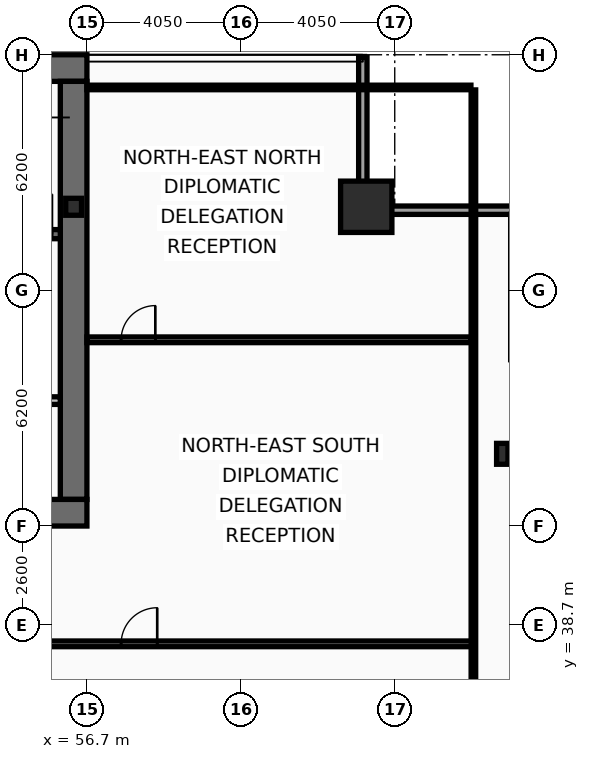
"""IFC4 building model, lengths in metres.
Left out: names, types, materials, properties, quantities, classifications, styles, units other than length and angle.
Written with IfcOpenShell. Run it as: python <this file> out.ifc"""

import sys

from ifc_helpers import new_model, si_unit, direction, frame, frame_2d, origin, origin_2d, place, context, subcontext, project, spatial, rectangle, hollow_rectangle, i_section, extrude, element, fill, save


model = new_model("IFC4")
c1 = context("Model", 3, precision=1e-05, world=origin(), true_north=direction((0.0, 1.0)))
c2 = subcontext(c1, "Body", "Model", "MODEL_VIEW")
j1 = project(units=[si_unit("LENGTHUNIT", "METRE"), si_unit("PLANEANGLEUNIT", "RADIAN")], contexts=[c1])
p1 = place(None, origin())
s1 = spatial("IfcSite", under=j1, at=p1, CompositionType="ELEMENT")
p2 = place(p1, origin())
s2 = spatial("IfcBuilding", under=s1, at=p2, CompositionType="ELEMENT")
p3 = place(p2, frame((0.0, 0.0, 139.8)))
s3 = spatial("IfcBuildingStorey", under=s2, at=p3, CompositionType="ELEMENT", Elevation=139.8)
p4 = place(p3, frame((16.2, 53.35, 0.0), z_axis=(0.0, 0.0, 1.0), x_axis=(1.0, 0.0, 0.0)))
e1 = element("IfcWall", 1, at=p4, inside=s3, PredefinedType="SHEAR", context=c2, shape_type="SweptSolid", body=[
    extrude(rectangle(XDim=40.5, YDim=0.7, at=frame_2d((20.25, 0.0))), origin(), (0.0, 0.0, 1.0), 3.44),
])
p5 = place(p3, frame((56.35, 53.0, 0.0), z_axis=(0.0, 0.0, 1.0), x_axis=(0.0, -1.0, 0.0)))
e2 = element("IfcWall", 2, at=p5, inside=s3, PredefinedType="SHEAR", context=c2, shape_type="SweptSolid", body=[
    extrude(rectangle(XDim=11.0, YDim=0.7, at=frame_2d((5.5, 0.0))), origin(), (0.0, 0.0, 1.0), 3.44),
])
p6 = place(p3, frame((56.7, 41.65, 0.0), z_axis=(0.0, 0.0, 1.0), x_axis=(-1.0, 0.0, 0.0)))
e3 = element("IfcWall", 3, at=p6, inside=s3, PredefinedType="SHEAR", context=c2, shape_type="SweptSolid", body=[
    extrude(rectangle(XDim=2.45, YDim=0.7, at=frame_2d((1.225, 0.0))), origin(), (0.0, 0.0, 1.0), 3.44),
])
p7 = place(p3, frame((48.63, 48.98, 0.0), z_axis=(0.0, 0.0, 1.0), x_axis=(1.0, 0.0, 0.0)))
e4 = element("IfcWall", 4, at=p7, inside=s3, PredefinedType="SHEAR", context=c2, shape_type="SweptSolid", body=[
    extrude(rectangle(XDim=7.37, YDim=0.24, at=frame_2d((3.685, 0.0))), origin(), (0.0, 0.0, 1.0), 3.44),
])
p8 = place(p7, frame((6.1, 0.0, 0.0)))
e5 = element("IfcOpeningElement", 5, at=p8, cuts=e4, PredefinedType="OPENING", context=c2, shape_type="SweptSolid", body=[
    extrude(rectangle(XDim=1.05, YDim=2.15, at=frame_2d((0.525, 1.075))), frame((0.0, 0.13, 0.0), z_axis=(0.0, -1.0, 0.0), x_axis=(1.0, 0.0, 0.0)), (0.0, 0.0, 1.0), 0.26),
])
p9 = place(p3, frame((64.05, 49.7, 0.0), z_axis=(0.0, 0.0, 1.0), x_axis=(1.0, 0.0, 0.0)))
e6 = element("IfcColumn", 6, at=p9, inside=s3, PredefinedType="COLUMN", context=c2, shape_type="SweptSolid", body=[
    extrude(hollow_rectangle(XDim=1.35, YDim=1.35, WallThickness=0.065, at=origin_2d()), origin(), (0.0, 0.0, 1.0), 3.6),
])
p10 = place(p3, frame((67.63, 43.2, 0.0), z_axis=(0.0, 0.0, 1.0), x_axis=(1.0, 0.0, 0.0)))
e7 = element("IfcColumn", 7, at=p10, inside=s3, PredefinedType="COLUMN", context=c2, shape_type="SweptSolid", body=[
    extrude(i_section(OverallWidth=0.3, OverallDepth=0.55, WebThickness=0.015, FlangeThickness=0.029, at=origin_2d()), origin(), (0.0, 0.0, 1.0), 3.6),
])
p11 = place(p3, frame((56.35, 49.7, 0.0), z_axis=(0.0, 0.0, 1.0), x_axis=(1.0, 0.0, 0.0)))
e8 = element("IfcColumn", 8, at=p11, inside=s3, PredefinedType="COLUMN", context=c2, shape_type="SweptSolid", body=[
    extrude(i_section(OverallWidth=0.416, OverallDepth=0.446, WebThickness=0.039, FlangeThickness=0.063, at=origin_2d()), origin(), (0.0, 0.0, 1.0), 3.6),
])
p12 = place(p3, frame((63.96, 53.63, 0.0), z_axis=(0.0, 0.0, 1.0), x_axis=(0.0, -1.0, 0.0)))
e9 = element("IfcWall", 9, at=p12, inside=s3, PredefinedType="SOLIDWALL", context=c2, shape_type="SweptSolid", body=[
    extrude(rectangle(XDim=3.91, YDim=0.22, at=frame_2d((1.955, 0.0))), origin(), (0.0, 0.0, 1.0), 2.83),
])
p13 = place(p3, frame((63.85, 49.61, 0.0), z_axis=(0.0, 0.0, 1.0), x_axis=(1.0, 0.0, 0.0)))
e10 = element("IfcWall", 10, at=p13, inside=s3, PredefinedType="SOLIDWALL", context=c2, shape_type="SweptSolid", body=[
    extrude(rectangle(XDim=4.22, YDim=0.22, at=frame_2d((2.11, 0.0))), origin(), (0.0, 0.0, 1.0), 2.83),
])
p14 = place(p3, frame((51.9, 44.6, 0.0), z_axis=(0.0, 0.0, 1.0), x_axis=(1.0, 0.0, 0.0)))
e11 = element("IfcWall", 11, at=p14, inside=s3, PredefinedType="PARTITIONING", context=c2, shape_type="SweptSolid", body=[
    extrude(rectangle(XDim=4.1, YDim=0.2, at=frame_2d((2.05, 0.0))), origin(), (0.0, 0.0, 1.0), 3.44),
])
p15 = place(p14, frame((1.15, 0.0, 0.0)))
e12 = element("IfcOpeningElement", 12, at=p15, cuts=e11, PredefinedType="OPENING", context=c2, shape_type="SweptSolid", body=[
    extrude(rectangle(XDim=1.05, YDim=2.15, at=frame_2d((0.525, 1.075))), frame((0.0, 0.11, 0.0), z_axis=(0.0, -1.0, 0.0), x_axis=(1.0, 0.0, 0.0)), (0.0, 0.0, 1.0), 0.22),
])
p16 = place(p3, frame((54.35, 38.2, 0.0), z_axis=(0.0, 0.0, 1.0), x_axis=(1.0, 0.0, 0.0)))
e13 = element("IfcWall", 13, at=p16, inside=s3, PredefinedType="PARTITIONING", context=c2, shape_type="SweptSolid", body=[
    extrude(rectangle(XDim=12.52, YDim=0.15, at=frame_2d((6.26, 0.0))), origin(), (0.0, 0.0, 1.0), 2.73),
])
p17 = place(p16, frame((3.25, 0.0, 0.0)))
e14 = element("IfcOpeningElement", 14, at=p17, cuts=e13, PredefinedType="OPENING", context=c2, shape_type="SweptSolid", body=[
    extrude(rectangle(XDim=0.95, YDim=2.05, at=frame_2d((0.475, 1.025))), frame((0.0, 0.085, 0.0), z_axis=(0.0, -1.0, 0.0), x_axis=(1.0, 0.0, 0.0)), (0.0, 0.0, 1.0), 0.17),
])
p18 = place(p3, frame((56.7, 46.2, 0.0), z_axis=(0.0, 0.0, 1.0), x_axis=(1.0, 0.0, 0.0)))
e15 = element("IfcWall", 15, at=p18, inside=s3, PredefinedType="PARTITIONING", context=c2, shape_type="SweptSolid", body=[
    extrude(rectangle(XDim=10.105, YDim=0.15, at=frame_2d((5.052, 0.0))), origin(), (0.0, 0.0, 1.0), 2.83),
])
p19 = place(p18, frame((0.9, 0.0, 0.0)))
e16 = element("IfcOpeningElement", 16, at=p19, cuts=e15, PredefinedType="OPENING", context=c2, shape_type="SweptSolid", body=[
    extrude(rectangle(XDim=0.9, YDim=2.05, at=frame_2d((0.45, 1.025))), frame((0.0, 0.085, 0.0), z_axis=(0.0, -1.0, 0.0), x_axis=(1.0, 0.0, 0.0)), (0.0, 0.0, 1.0), 0.17),
])
p20 = place(p3, frame((66.87, 10.665, 0.0), z_axis=(0.0, 0.0, 1.0), x_axis=(0.0, 1.0, 0.0)))
e17 = element("IfcWall", 17, at=p20, inside=s3, PredefinedType="PARTITIONING", context=c2, shape_type="SweptSolid", body=[
    extrude(rectangle(XDim=42.11, YDim=0.12, at=frame_2d((21.055, 0.0))), origin(), (0.0, 0.0, 1.0), 2.73),
])
p21 = place(p3, frame((56.7, 52.84, 0.0), z_axis=(0.0, 0.0, 1.0), x_axis=(1.0, 0.0, 0.0)))
e18 = element("IfcWall", 18, at=p21, inside=s3, PredefinedType="PARTITIONING", context=c2, shape_type="SweptSolid", body=[
    extrude(rectangle(XDim=10.105, YDim=0.12, at=frame_2d((5.052, 0.0))), origin(), (0.0, 0.0, 1.0), 3.44),
])
p22 = place(p17, origin())
e19 = element("IfcDoor", 19, at=p22, inside=s3, OperationType="SINGLE_SWING_RIGHT", PredefinedType="DOOR", context=c2, shape_type="SweptSolid", body=[
    extrude(rectangle(XDim=0.95, YDim=2.05, at=frame_2d((0.475, 1.025))), frame((0.0, 0.025, 0.0), z_axis=(0.0, -1.0, 0.0), x_axis=(1.0, 0.0, 0.0)), (0.0, 0.0, 1.0), 0.05),
])
fill(e14, e19)
p23 = place(p19, origin())
e20 = element("IfcDoor", 20, at=p23, inside=s3, OperationType="SINGLE_SWING_RIGHT", PredefinedType="DOOR", context=c2, shape_type="SweptSolid", body=[
    extrude(rectangle(XDim=0.9, YDim=2.05, at=frame_2d((0.45, 1.025))), frame((0.0, 0.025, 0.0), z_axis=(0.0, -1.0, 0.0), x_axis=(1.0, 0.0, 0.0)), (0.0, 0.0, 1.0), 0.05),
])
fill(e16, e20)
save(model, sys.argv[1])
